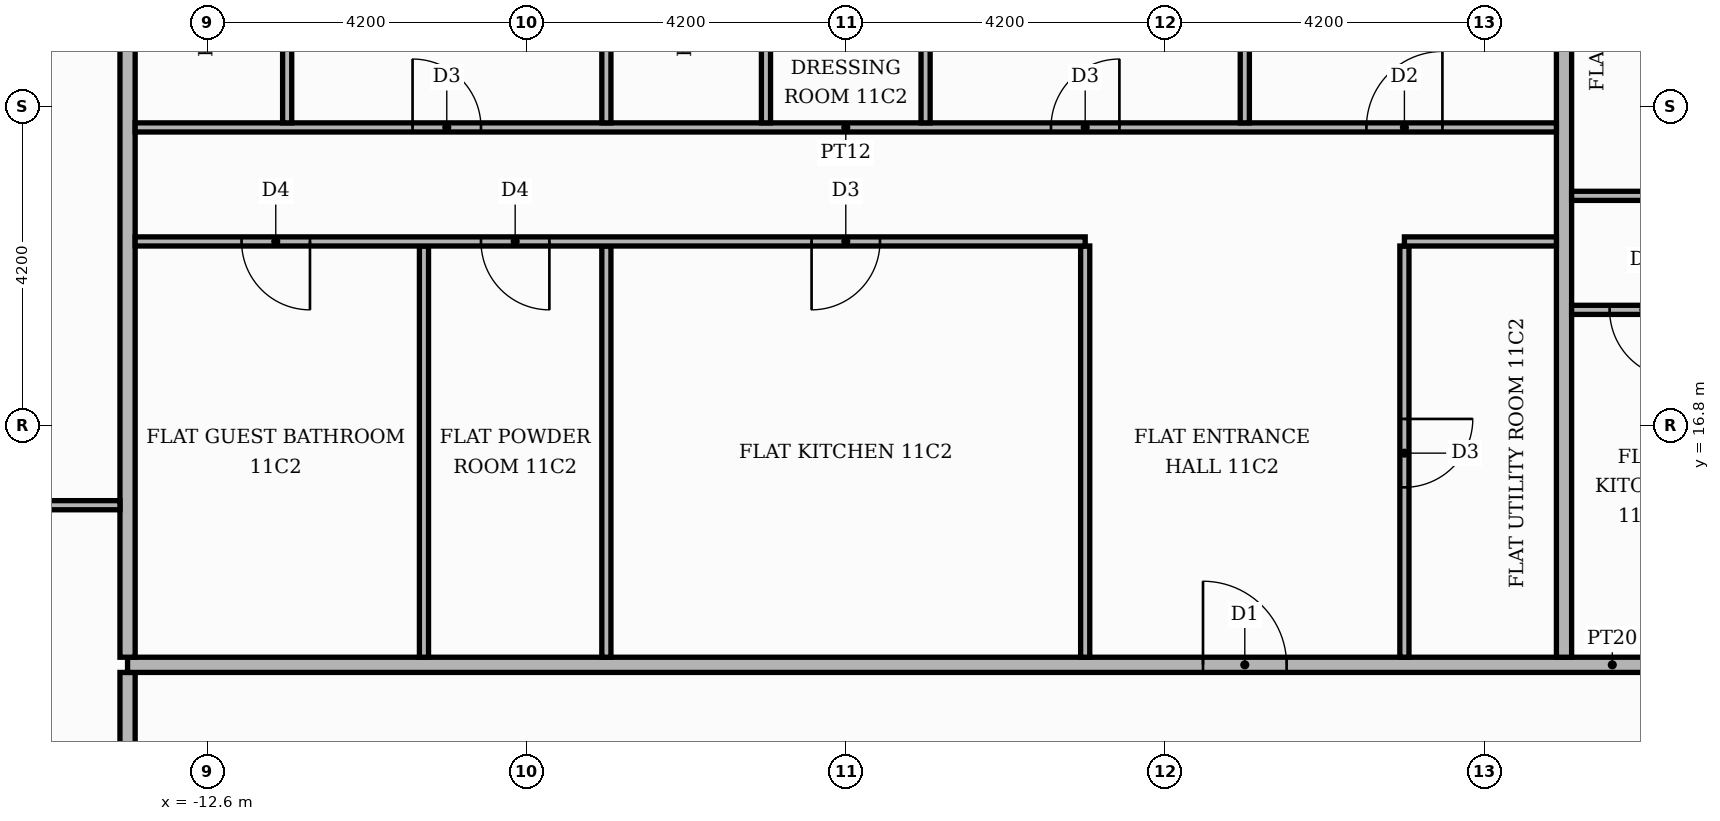
"""IFC4 building model, lengths in metres.
Left out: names, types, materials, properties, quantities, classifications, styles, units other than length and angle.
Written with IfcOpenShell. Run it as: python <this file> out.ifc"""

import sys

from ifc_helpers import new_model, si_unit, direction, frame, frame_2d, origin, place, context, subcontext, project, spatial, rectangle, extrude, element, fill, save


model = new_model("IFC4")
c1 = context("Model", 3, precision=1e-05, world=origin(), true_north=direction((0.0, 1.0)))
c2 = subcontext(c1, "Body", "Model", "MODEL_VIEW")
j1 = project(units=[si_unit("LENGTHUNIT", "METRE"), si_unit("PLANEANGLEUNIT", "RADIAN")], contexts=[c1])
p1 = place(None, origin())
s1 = spatial("IfcSite", under=j1, at=p1, CompositionType="ELEMENT")
p2 = place(p1, origin())
s2 = spatial("IfcBuilding", under=s1, at=p2, CompositionType="ELEMENT")
p3 = place(p2, frame((0.0, 0.0, 50.4)))
s3 = spatial("IfcBuildingStorey", under=s2, at=p3, CompositionType="ELEMENT", Elevation=50.4)
p4 = place(p3, frame((-13.65, 5.35, 0.0), z_axis=(0.0, 0.0, 1.0), x_axis=(0.0, 1.0, 0.0)))
e1 = element("IfcWall", 1, at=p4, inside=s3, PredefinedType="PARTITIONING", context=c2, shape_type="SweptSolid", body=[
    extrude(rectangle(XDim=8.2, YDim=0.2, at=frame_2d((4.1, 0.0))), origin(), (0.0, 0.0, 1.0), 3.48),
])
p5 = place(p4, frame((5.65, 0.0, 0.0)))
e2 = element("IfcOpeningElement", 2, at=p5, cuts=e1, PredefinedType="OPENING", context=c2, shape_type="SweptSolid", body=[
    extrude(rectangle(XDim=1.1, YDim=2.4, at=frame_2d((0.55, 1.2))), frame((0.0, 0.11, 0.0), z_axis=(0.0, -1.0, 0.0), x_axis=(1.0, 0.0, 0.0)), (0.0, 0.0, 1.0), 0.22),
])
p6 = place(p3, frame((-13.65, 13.65, 0.0), z_axis=(0.0, 0.0, 1.0), x_axis=(1.0, 0.0, 0.0)))
e3 = element("IfcWall", 3, at=p6, inside=s3, PredefinedType="PARTITIONING", context=c2, shape_type="SweptSolid", body=[
    extrude(rectangle(XDim=39.07, YDim=0.2, at=frame_2d((19.535, 0.0))), origin(), (0.0, 0.0, 1.0), 3.48),
])
p7 = place(p6, frame((24.65, 0.0, 0.0)))
e4 = element("IfcOpeningElement", 4, at=p7, cuts=e3, PredefinedType="OPENING", context=c2, shape_type="SweptSolid", body=[
    extrude(rectangle(XDim=1.1, YDim=2.4, at=frame_2d((0.55, 1.2))), frame((0.0, 0.11, 0.0), z_axis=(0.0, -1.0, 0.0), x_axis=(1.0, 0.0, 0.0)), (0.0, 0.0, 1.0), 0.22),
])
p8 = place(p6, frame((14.15, 0.0, 0.0)))
e5 = element("IfcOpeningElement", 5, at=p8, cuts=e3, PredefinedType="OPENING", context=c2, shape_type="SweptSolid", body=[
    extrude(rectangle(XDim=1.1, YDim=2.4, at=frame_2d((0.55, 1.2))), frame((0.0, 0.11, 0.0), z_axis=(0.0, -1.0, 0.0), x_axis=(1.0, 0.0, 0.0)), (0.0, 0.0, 1.0), 0.22),
])
p9 = place(p3, frame((-13.65, 13.75, 0.0), z_axis=(0.0, 0.0, 1.0), x_axis=(0.0, 1.0, 0.0)))
e6 = element("IfcWall", 6, at=p9, inside=s3, PredefinedType="PARTITIONING", context=c2, shape_type="SweptSolid", body=[
    extrude(rectangle(XDim=11.67, YDim=0.2, at=frame_2d((5.835, 0.0))), origin(), (0.0, 0.0, 1.0), 3.48),
])
for number, where, z_axis, x_axis in (
    (7, (-9.75, 13.75, 0.0), (0.0, 0.0, 1.0), (0.0, 1.0, 0.0)),
    (8, (-7.35, 13.75, 0.0), (0.0, 0.0, 1.0), (0.0, 1.0, 0.0)),
    (9, (-1.05, 13.75, 0.0), (0.0, 0.0, 1.0), (0.0, 1.0, 0.0)),
):
    element("IfcWall", number, at=place(p3, frame(where, z_axis=z_axis, x_axis=x_axis)), inside=s3, PredefinedType="PARTITIONING", context=c2, shape_type="SweptSolid", body=[
        extrude(rectangle(XDim=5.41, YDim=0.12, at=frame_2d((2.705, 0.0))), origin(), (0.0, 0.0, 1.0), 3.48),
    ])
p10 = place(p3, frame((3.15, 13.75, 0.0), z_axis=(0.0, 0.0, 1.0), x_axis=(0.0, 1.0, 0.0)))
e10 = element("IfcWall", 10, at=p10, inside=s3, PredefinedType="PARTITIONING", context=c2, shape_type="SweptSolid", body=[
    extrude(rectangle(XDim=5.41, YDim=0.12, at=frame_2d((2.705, 0.0))), origin(), (0.0, 0.0, 1.0), 3.48),
])
p11 = place(p10, frame((2.235, 0.0, 0.0)))
e11 = element("IfcOpeningElement", 11, at=p11, cuts=e10, PredefinedType="OPENING", context=c2, shape_type="SweptSolid", body=[
    extrude(rectangle(XDim=0.9, YDim=2.1, at=frame_2d((0.45, 1.05))), frame((0.0, 0.07, 0.0), z_axis=(0.0, -1.0, 0.0), x_axis=(1.0, 0.0, 0.0)), (0.0, 0.0, 1.0), 0.14),
])
p12 = place(p3, frame((5.25, 13.75, 0.0), z_axis=(0.0, 0.0, 1.0), x_axis=(0.0, 1.0, 0.0)))
e12 = element("IfcWall", 12, at=p12, inside=s3, PredefinedType="PARTITIONING", context=c2, shape_type="SweptSolid", body=[
    extrude(rectangle(XDim=11.67, YDim=0.2, at=frame_2d((5.835, 0.0))), origin(), (0.0, 0.0, 1.0), 3.48),
])
p13 = place(p3, frame((-19.82, 15.75, 0.0), z_axis=(0.0, 0.0, 1.0), x_axis=(1.0, 0.0, 0.0)))
e13 = element("IfcWall", 13, at=p13, inside=s3, PredefinedType="PARTITIONING", context=c2, shape_type="SweptSolid", body=[
    extrude(rectangle(XDim=6.07, YDim=0.12, at=frame_2d((3.035, 0.0))), origin(), (0.0, 0.0, 1.0), 3.48),
])
p14 = place(p13, frame((2.585, 0.0, 0.0)))
e14 = element("IfcOpeningElement", 14, at=p14, cuts=e13, PredefinedType="OPENING", context=c2, shape_type="SweptSolid", body=[
    extrude(rectangle(XDim=1.0, YDim=2.1, at=frame_2d((0.5, 1.05))), frame((0.0, 0.07, 0.0), z_axis=(0.0, -1.0, 0.0), x_axis=(1.0, 0.0, 0.0)), (0.0, 0.0, 1.0), 0.14),
])
p15 = place(p3, frame((5.35, 18.32, 0.0), z_axis=(0.0, 0.0, 1.0), x_axis=(1.0, 0.0, 0.0)))
e15 = element("IfcWall", 15, at=p15, inside=s3, PredefinedType="PARTITIONING", context=c2, shape_type="SweptSolid", body=[
    extrude(rectangle(XDim=4.1, YDim=0.12, at=frame_2d((2.05, 0.0))), origin(), (0.0, 0.0, 1.0), 3.48),
])
p16 = place(p15, frame((0.5, 0.0, 0.0)))
e16 = element("IfcOpeningElement", 16, at=p16, cuts=e15, PredefinedType="OPENING", context=c2, shape_type="SweptSolid", body=[
    extrude(rectangle(XDim=0.9, YDim=2.1, at=frame_2d((0.45, 1.05))), frame((0.0, 0.07, 0.0), z_axis=(0.0, -1.0, 0.0), x_axis=(1.0, 0.0, 0.0)), (0.0, 0.0, 1.0), 0.14),
])
p17 = place(p3, frame((-13.55, 19.22, 0.0), z_axis=(0.0, 0.0, 1.0), x_axis=(1.0, 0.0, 0.0)))
e17 = element("IfcWall", 17, at=p17, inside=s3, PredefinedType="PARTITIONING", context=c2, shape_type="SweptSolid", body=[
    extrude(rectangle(XDim=12.5, YDim=0.12, at=frame_2d((6.25, 0.0))), origin(), (0.0, 0.0, 1.0), 3.48),
])
p18 = place(p17, frame((8.9, 0.0, 0.0)))
e18 = element("IfcOpeningElement", 18, at=p18, cuts=e17, PredefinedType="OPENING", context=c2, shape_type="SweptSolid", body=[
    extrude(rectangle(XDim=0.9, YDim=2.1, at=frame_2d((0.45, 1.05))), frame((0.0, 0.07, 0.0), z_axis=(0.0, -1.0, 0.0), x_axis=(1.0, 0.0, 0.0)), (0.0, 0.0, 1.0), 0.14),
])
p19 = place(p17, frame((4.55, 0.0, 0.0)))
e19 = element("IfcOpeningElement", 19, at=p19, cuts=e17, PredefinedType="OPENING", context=c2, shape_type="SweptSolid", body=[
    extrude(rectangle(XDim=0.9, YDim=2.1, at=frame_2d((0.45, 1.05))), frame((0.0, 0.07, 0.0), z_axis=(0.0, -1.0, 0.0), x_axis=(1.0, 0.0, 0.0)), (0.0, 0.0, 1.0), 0.14),
])
p20 = place(p17, frame((1.4, 0.0, 0.0)))
e20 = element("IfcOpeningElement", 20, at=p20, cuts=e17, PredefinedType="OPENING", context=c2, shape_type="SweptSolid", body=[
    extrude(rectangle(XDim=0.9, YDim=2.1, at=frame_2d((0.45, 1.05))), frame((0.0, 0.07, 0.0), z_axis=(0.0, -1.0, 0.0), x_axis=(1.0, 0.0, 0.0)), (0.0, 0.0, 1.0), 0.14),
])
p21 = place(p3, frame((3.15, 19.22, 0.0), z_axis=(0.0, 0.0, 1.0), x_axis=(1.0, 0.0, 0.0)))
e21 = element("IfcWall", 21, at=p21, inside=s3, PredefinedType="PARTITIONING", context=c2, shape_type="SweptSolid", body=[
    extrude(rectangle(XDim=2.0, YDim=0.12, at=frame_2d((1.0, 0.0))), origin(), (0.0, 0.0, 1.0), 3.48),
])
p22 = place(p3, frame((5.35, 19.82, 0.0), z_axis=(0.0, 0.0, 1.0), x_axis=(1.0, 0.0, 0.0)))
e22 = element("IfcWall", 22, at=p22, inside=s3, PredefinedType="PARTITIONING", context=c2, shape_type="SweptSolid", body=[
    extrude(rectangle(XDim=11.95, YDim=0.12, at=frame_2d((5.975, 0.0))), origin(), (0.0, 0.0, 1.0), 3.48),
])
p23 = place(p22, frame((8.85, 0.0, 0.0)))
e23 = element("IfcOpeningElement", 23, at=p23, cuts=e22, PredefinedType="OPENING", context=c2, shape_type="SweptSolid", body=[
    extrude(rectangle(XDim=1.0, YDim=2.1, at=frame_2d((0.5, 1.05))), frame((0.0, 0.07, 0.0), z_axis=(0.0, -1.0, 0.0), x_axis=(1.0, 0.0, 0.0)), (0.0, 0.0, 1.0), 0.14),
])
p24 = place(p22, frame((5.75, 0.0, 0.0)))
e24 = element("IfcOpeningElement", 24, at=p24, cuts=e22, PredefinedType="OPENING", context=c2, shape_type="SweptSolid", body=[
    extrude(rectangle(XDim=0.9, YDim=2.1, at=frame_2d((0.45, 1.05))), frame((0.0, 0.07, 0.0), z_axis=(0.0, -1.0, 0.0), x_axis=(1.0, 0.0, 0.0)), (0.0, 0.0, 1.0), 0.14),
])
p25 = place(p3, frame((-13.55, 20.72, 0.0), z_axis=(0.0, 0.0, 1.0), x_axis=(1.0, 0.0, 0.0)))
e25 = element("IfcWall", 25, at=p25, inside=s3, PredefinedType="PARTITIONING", context=c2, shape_type="SweptSolid", body=[
    extrude(rectangle(XDim=18.7, YDim=0.12, at=frame_2d((9.35, 0.0))), origin(), (0.0, 0.0, 1.0), 3.48),
])
p26 = place(p25, frame((16.2, 0.0, 0.0)))
e26 = element("IfcOpeningElement", 26, at=p26, cuts=e25, PredefinedType="OPENING", context=c2, shape_type="SweptSolid", body=[
    extrude(rectangle(XDim=1.0, YDim=2.1, at=frame_2d((0.5, 1.05))), frame((0.0, 0.07, 0.0), z_axis=(0.0, -1.0, 0.0), x_axis=(1.0, 0.0, 0.0)), (0.0, 0.0, 1.0), 0.14),
])
p27 = place(p25, frame((12.05, 0.0, 0.0)))
e27 = element("IfcOpeningElement", 27, at=p27, cuts=e25, PredefinedType="OPENING", context=c2, shape_type="SweptSolid", body=[
    extrude(rectangle(XDim=0.9, YDim=2.1, at=frame_2d((0.45, 1.05))), frame((0.0, 0.07, 0.0), z_axis=(0.0, -1.0, 0.0), x_axis=(1.0, 0.0, 0.0)), (0.0, 0.0, 1.0), 0.14),
])
p28 = place(p25, frame((3.65, 0.0, 0.0)))
e28 = element("IfcOpeningElement", 28, at=p28, cuts=e25, PredefinedType="OPENING", context=c2, shape_type="SweptSolid", body=[
    extrude(rectangle(XDim=0.9, YDim=2.1, at=frame_2d((0.45, 1.05))), frame((0.0, 0.07, 0.0), z_axis=(0.0, -1.0, 0.0), x_axis=(1.0, 0.0, 0.0)), (0.0, 0.0, 1.0), 0.14),
])
p29 = place(p3, frame((-11.55, 20.78, 0.0), z_axis=(0.0, 0.0, 1.0), x_axis=(0.0, 1.0, 0.0)))
e29 = element("IfcWall", 29, at=p29, inside=s3, PredefinedType="PARTITIONING", context=c2, shape_type="SweptSolid", body=[
    extrude(rectangle(XDim=4.64, YDim=0.12, at=frame_2d((2.32, 0.0))), origin(), (0.0, 0.0, 1.0), 3.48),
])
p30 = place(p29, frame((1.99, 0.0, 0.0)))
e30 = element("IfcOpeningElement", 30, at=p30, cuts=e29, PredefinedType="OPENING", context=c2, shape_type="SweptSolid", body=[
    extrude(rectangle(XDim=0.9, YDim=2.1, at=frame_2d((0.45, 1.05))), frame((0.0, 0.07, 0.0), z_axis=(0.0, -1.0, 0.0), x_axis=(1.0, 0.0, 0.0)), (0.0, 0.0, 1.0), 0.14),
])
p31 = place(p3, frame((-7.35, 20.78, 0.0), z_axis=(0.0, 0.0, 1.0), x_axis=(0.0, 1.0, 0.0)))
e31 = element("IfcWall", 31, at=p31, inside=s3, PredefinedType="PARTITIONING", context=c2, shape_type="SweptSolid", body=[
    extrude(rectangle(XDim=4.64, YDim=0.12, at=frame_2d((2.32, 0.0))), origin(), (0.0, 0.0, 1.0), 3.48),
])
p32 = place(p3, frame((-5.25, 20.78, 0.0), z_axis=(0.0, 0.0, 1.0), x_axis=(0.0, 1.0, 0.0)))
e32 = element("IfcWall", 32, at=p32, inside=s3, PredefinedType="PARTITIONING", context=c2, shape_type="SweptSolid", body=[
    extrude(rectangle(XDim=4.64, YDim=0.12, at=frame_2d((2.32, 0.0))), origin(), (0.0, 0.0, 1.0), 3.48),
])
p33 = place(p32, frame((1.99, 0.0, 0.0)))
e33 = element("IfcOpeningElement", 33, at=p33, cuts=e32, PredefinedType="OPENING", context=c2, shape_type="SweptSolid", body=[
    extrude(rectangle(XDim=0.9, YDim=2.1, at=frame_2d((0.45, 1.05))), frame((0.0, 0.07, 0.0), z_axis=(0.0, -1.0, 0.0), x_axis=(1.0, 0.0, 0.0)), (0.0, 0.0, 1.0), 0.14),
])
p34 = place(p3, frame((-3.15, 20.78, 0.0), z_axis=(0.0, 0.0, 1.0), x_axis=(0.0, 1.0, 0.0)))
e34 = element("IfcWall", 34, at=p34, inside=s3, PredefinedType="PARTITIONING", context=c2, shape_type="SweptSolid", body=[
    extrude(rectangle(XDim=4.64, YDim=0.12, at=frame_2d((2.32, 0.0))), origin(), (0.0, 0.0, 1.0), 3.48),
])
p35 = place(p34, frame((1.99, 0.0, 0.0)))
e35 = element("IfcOpeningElement", 35, at=p35, cuts=e34, PredefinedType="OPENING", context=c2, shape_type="SweptSolid", body=[
    extrude(rectangle(XDim=0.9, YDim=2.1, at=frame_2d((0.45, 1.05))), frame((0.0, 0.07, 0.0), z_axis=(0.0, -1.0, 0.0), x_axis=(1.0, 0.0, 0.0)), (0.0, 0.0, 1.0), 0.14),
])
p36 = place(p3, frame((1.05, 20.78, 0.0), z_axis=(0.0, 0.0, 1.0), x_axis=(0.0, 1.0, 0.0)))
e36 = element("IfcWall", 36, at=p36, inside=s3, PredefinedType="PARTITIONING", context=c2, shape_type="SweptSolid", body=[
    extrude(rectangle(XDim=4.64, YDim=0.12, at=frame_2d((2.32, 0.0))), origin(), (0.0, 0.0, 1.0), 3.48),
])
p37 = place(p16, frame((0.9, 0.0, 0.0), z_axis=(0.0, 0.0, 1.0), x_axis=(-1.0, 0.0, 0.0)))
e37 = element("IfcDoor", 37, at=p37, inside=s3, OperationType="SINGLE_SWING_RIGHT", PredefinedType="DOOR", context=c2, shape_type="SweptSolid", body=[
    extrude(rectangle(XDim=0.9, YDim=2.1, at=frame_2d((0.45, 1.05))), frame((0.0, 0.025, 0.0), z_axis=(0.0, -1.0, 0.0), x_axis=(1.0, 0.0, 0.0)), (0.0, 0.0, 1.0), 0.05),
])
fill(e16, e37)
p38 = place(p8, origin())
e38 = element("IfcDoor", 38, at=p38, inside=s3, OperationType="SINGLE_SWING_LEFT", PredefinedType="DOOR", context=c2, shape_type="SweptSolid", body=[
    extrude(rectangle(XDim=1.1, YDim=2.4, at=frame_2d((0.55, 1.2))), frame((0.0, 0.025, 0.0), z_axis=(0.0, -1.0, 0.0), x_axis=(1.0, 0.0, 0.0)), (0.0, 0.0, 1.0), 0.05),
])
fill(e5, e38)
p39 = place(p11, frame((0.9, 0.0, 0.0), z_axis=(0.0, 0.0, 1.0), x_axis=(-1.0, 0.0, 0.0)))
e39 = element("IfcDoor", 39, at=p39, inside=s3, OperationType="SINGLE_SWING_RIGHT", PredefinedType="DOOR", context=c2, shape_type="SweptSolid", body=[
    extrude(rectangle(XDim=0.9, YDim=2.1, at=frame_2d((0.45, 1.05))), frame((0.0, 0.025, 0.0), z_axis=(0.0, -1.0, 0.0), x_axis=(1.0, 0.0, 0.0)), (0.0, 0.0, 1.0), 0.05),
])
fill(e11, e39)
p40 = place(p18, frame((0.9, 0.0, 0.0), z_axis=(0.0, 0.0, 1.0), x_axis=(-1.0, 0.0, 0.0)))
e40 = element("IfcDoor", 40, at=p40, inside=s3, OperationType="SINGLE_SWING_LEFT", PredefinedType="DOOR", context=c2, shape_type="SweptSolid", body=[
    extrude(rectangle(XDim=0.9, YDim=2.1, at=frame_2d((0.45, 1.05))), frame((0.0, 0.025, 0.0), z_axis=(0.0, -1.0, 0.0), x_axis=(1.0, 0.0, 0.0)), (0.0, 0.0, 1.0), 0.05),
])
fill(e18, e40)
p41 = place(p19, frame((0.9, 0.0, 0.0), z_axis=(0.0, 0.0, 1.0), x_axis=(-1.0, 0.0, 0.0)))
e41 = element("IfcDoor", 41, at=p41, inside=s3, OperationType="SINGLE_SWING_RIGHT", PredefinedType="DOOR", context=c2, shape_type="SweptSolid", body=[
    extrude(rectangle(XDim=0.9, YDim=2.1, at=frame_2d((0.45, 1.05))), frame((0.0, 0.025, 0.0), z_axis=(0.0, -1.0, 0.0), x_axis=(1.0, 0.0, 0.0)), (0.0, 0.0, 1.0), 0.05),
])
fill(e19, e41)
p42 = place(p20, frame((0.9, 0.0, 0.0), z_axis=(0.0, 0.0, 1.0), x_axis=(-1.0, 0.0, 0.0)))
e42 = element("IfcDoor", 42, at=p42, inside=s3, OperationType="SINGLE_SWING_RIGHT", PredefinedType="DOOR", context=c2, shape_type="SweptSolid", body=[
    extrude(rectangle(XDim=0.9, YDim=2.1, at=frame_2d((0.45, 1.05))), frame((0.0, 0.025, 0.0), z_axis=(0.0, -1.0, 0.0), x_axis=(1.0, 0.0, 0.0)), (0.0, 0.0, 1.0), 0.05),
])
fill(e20, e42)
p43 = place(p26, origin())
e43 = element("IfcDoor", 43, at=p43, inside=s3, OperationType="SINGLE_SWING_RIGHT", PredefinedType="DOOR", context=c2, shape_type="SweptSolid", body=[
    extrude(rectangle(XDim=1.0, YDim=2.1, at=frame_2d((0.5, 1.05))), frame((0.0, 0.025, 0.0), z_axis=(0.0, -1.0, 0.0), x_axis=(1.0, 0.0, 0.0)), (0.0, 0.0, 1.0), 0.05),
])
fill(e26, e43)
p44 = place(p27, origin())
e44 = element("IfcDoor", 44, at=p44, inside=s3, OperationType="SINGLE_SWING_RIGHT", PredefinedType="DOOR", context=c2, shape_type="SweptSolid", body=[
    extrude(rectangle(XDim=0.9, YDim=2.1, at=frame_2d((0.45, 1.05))), frame((0.0, 0.025, 0.0), z_axis=(0.0, -1.0, 0.0), x_axis=(1.0, 0.0, 0.0)), (0.0, 0.0, 1.0), 0.05),
])
fill(e27, e44)
p45 = place(p28, origin())
e45 = element("IfcDoor", 45, at=p45, inside=s3, OperationType="SINGLE_SWING_LEFT", PredefinedType="DOOR", context=c2, shape_type="SweptSolid", body=[
    extrude(rectangle(XDim=0.9, YDim=2.1, at=frame_2d((0.45, 1.05))), frame((0.0, 0.025, 0.0), z_axis=(0.0, -1.0, 0.0), x_axis=(1.0, 0.0, 0.0)), (0.0, 0.0, 1.0), 0.05),
])
fill(e28, e45)
save(model, sys.argv[1])
